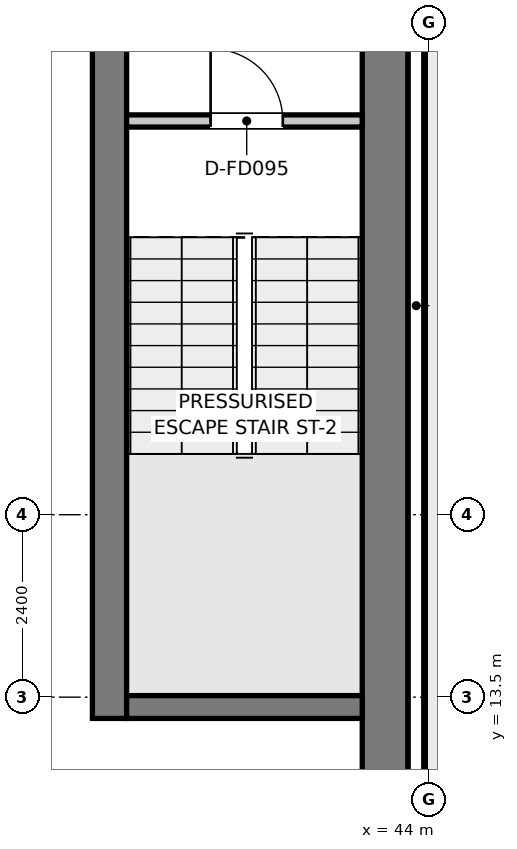
"""IFC4 building model, lengths in metres.
Left out: names, types, materials, properties, quantities, classifications, styles, units other than length and angle.
Written with IfcOpenShell. Run it as: python <this file> out.ifc"""

import sys

from ifc_helpers import new_model, si_unit, direction, frame, frame_2d, origin, place, context, subcontext, project, spatial, rectangle, extrude, element, fill, save


model = new_model("IFC4")
c1 = context("Model", 3, precision=1e-05, world=origin(), true_north=direction((0.0, 1.0)))
c2 = subcontext(c1, "Body", "Model", "MODEL_VIEW")
j1 = project(units=[si_unit("LENGTHUNIT", "METRE"), si_unit("PLANEANGLEUNIT", "RADIAN")], contexts=[c1])
p1 = place(None, origin())
s1 = spatial("IfcSite", under=j1, at=p1, CompositionType="ELEMENT")
p2 = place(p1, origin())
s2 = spatial("IfcBuilding", under=s1, at=p2, CompositionType="ELEMENT")
p3 = place(p2, frame((0.0, 0.0, 378.25)))
s3 = spatial("IfcBuildingStorey", under=s2, at=p3, CompositionType="ELEMENT", Elevation=378.25)
p4 = place(p3, frame((39.795, 13.22, 0.0), z_axis=(0.0, 0.0, 1.0), x_axis=(0.0, 1.0, 0.0)))
e1 = element("IfcWall", 1, at=p4, inside=s3, PredefinedType="SHEAR", context=c2, shape_type="SweptSolid", body=[
    extrude(rectangle(XDim=12.98, YDim=0.45, at=frame_2d((6.49, 0.0))), origin(), (0.0, 0.0, 1.0), 3.6),
])
p5 = place(p4, frame((10.58, 0.0, 0.0)))
e2 = element("IfcOpeningElement", 2, at=p5, cuts=e1, PredefinedType="OPENING", context=c2, shape_type="SweptSolid", body=[
    extrude(rectangle(XDim=1.1, YDim=2.15, at=frame_2d((0.55, 1.075))), frame((0.0, 0.235, 0.0), z_axis=(0.0, -1.0, 0.0), x_axis=(1.0, 0.0, 0.0)), (0.0, 0.0, 1.0), 0.47),
])
p6 = place(p3, frame((43.42, 11.1, 0.0), z_axis=(0.0, 0.0, 1.0), x_axis=(0.0, 1.0, 0.0)))
e3 = element("IfcWall", 3, at=p6, inside=s3, PredefinedType="SHEAR", context=c2, shape_type="SweptSolid", body=[
    extrude(rectangle(XDim=15.1, YDim=0.6, at=frame_2d((7.55, 0.0))), origin(), (0.0, 0.0, 1.0), 3.6),
])
p7 = place(p3, frame((40.02, 13.37, 0.0), z_axis=(0.0, 0.0, 1.0), x_axis=(1.0, 0.0, 0.0)))
e4 = element("IfcWall", 4, at=p7, inside=s3, PredefinedType="SHEAR", context=c2, shape_type="SweptSolid", body=[
    extrude(rectangle(XDim=3.1, YDim=0.3, at=frame_2d((1.55, 0.0))), origin(), (0.0, 0.0, 1.0), 3.6),
])
p8 = place(p3, frame((40.02, 21.08, 0.0), z_axis=(0.0, 0.0, 1.0), x_axis=(1.0, 0.0, 0.0)))
e5 = element("IfcWall", 5, at=p8, inside=s3, PredefinedType="PARTITIONING", context=c2, shape_type="SweptSolid", body=[
    extrude(rectangle(XDim=3.1, YDim=0.16, at=frame_2d((1.55, 0.0))), origin(), (0.0, 0.0, 1.0), 3.3),
])
p9 = place(p8, frame((1.105, 0.0, 0.0)))
e6 = element("IfcOpeningElement", 6, at=p9, cuts=e5, PredefinedType="OPENING", context=c2, shape_type="SweptSolid", body=[
    extrude(rectangle(XDim=0.95, YDim=2.1, at=frame_2d((0.475, 1.05))), frame((0.0, 0.09, 0.0), z_axis=(0.0, -1.0, 0.0), x_axis=(1.0, 0.0, 0.0)), (0.0, 0.0, 1.0), 0.18),
])
p10 = place(p9, origin())
e7 = element("IfcDoor", 7, at=p10, inside=s3, OperationType="SINGLE_SWING_LEFT", PredefinedType="DOOR", context=c2, shape_type="SweptSolid", body=[
    extrude(rectangle(XDim=0.95, YDim=2.1, at=frame_2d((0.475, 1.05))), frame((0.0, 0.025, 0.0), z_axis=(0.0, -1.0, 0.0), x_axis=(1.0, 0.0, 0.0)), (0.0, 0.0, 1.0), 0.05),
])
fill(e6, e7)
save(model, sys.argv[1])
